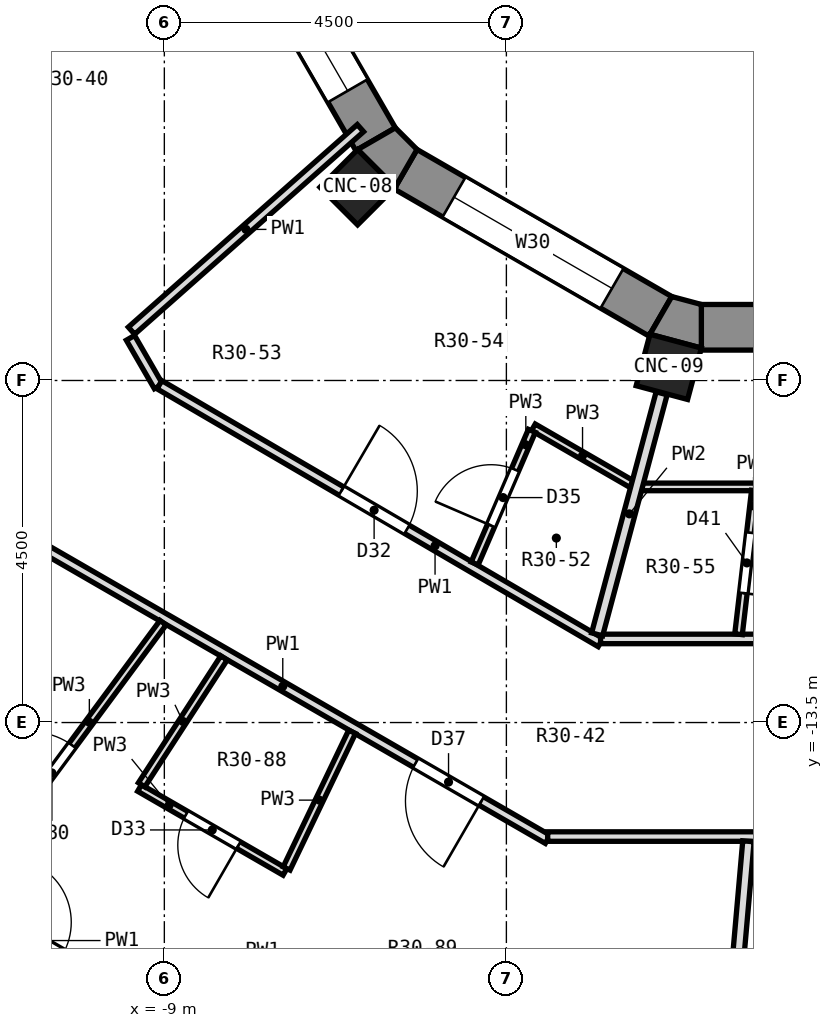
"""IFC4 building model, lengths in metres.
Left out: names, types, materials, properties, quantities, classifications, styles, units other than length and angle.
Written with IfcOpenShell. Run it as: python <this file> out.ifc"""

import sys

from ifc_helpers import new_model, si_unit, direction, frame, frame_2d, origin, origin_2d, place, context, subcontext, project, spatial, polyline, rectangle, outline, extrude, element, fill, save


model = new_model("IFC4")
c1 = context("Model", 3, precision=1e-05, world=origin(), true_north=direction((0.0, 1.0)))
c2 = subcontext(c1, "Body", "Model", "MODEL_VIEW")
j1 = project(units=[si_unit("LENGTHUNIT", "METRE"), si_unit("PLANEANGLEUNIT", "RADIAN")], contexts=[c1])
p1 = place(None, origin())
s1 = spatial("IfcSite", under=j1, at=p1, CompositionType="ELEMENT")
p2 = place(p1, origin())
s2 = spatial("IfcBuilding", under=s1, at=p2, CompositionType="ELEMENT")
p3 = place(p2, frame((0.0, 0.0, 210.3)))
s3 = spatial("IfcBuildingStorey", under=s2, at=p3, CompositionType="ELEMENT", Elevation=210.3)
for number, where, z_axis, x_axis in (
    (1, (-6.458, -6.458, 0.0), (0.0, 0.0, 1.0), (-0.707, -0.707, 0.0)),
    (2, (-2.364, -8.821, 0.0), (0.0, 0.0, 1.0), (-0.259, -0.966, 0.0)),
):
    element("IfcColumn", number, at=place(p3, frame(where, z_axis=z_axis, x_axis=x_axis)), inside=s3, PredefinedType="COLUMN", context=c2, shape_type="SweptSolid", body=[
        extrude(rectangle(XDim=0.7, YDim=0.7, at=origin_2d()), origin(), (0.0, 0.0, 1.0), 3.3),
    ])
p4 = place(p3, frame((-8.156, -2.474, 0.0), z_axis=(0.0, 0.0, 1.0), x_axis=(0.500033728941, -0.866005929495, 0.0)))
e3 = element("IfcWall", 3, at=p4, inside=s3, PredefinedType="SOLIDWALL", context=c2, shape_type="SweptSolid", body=[
    extrude(rectangle(XDim=3.87, YDim=0.6, at=frame_2d((1.935, 0.0))), origin(), (0.0, 0.0, 1.0), 2.85),
])
p5 = place(p4, frame((0.735, 0.0, 0.9)))
e4 = element("IfcOpeningElement", 4, at=p5, cuts=e3, PredefinedType="OPENING", context=c2, shape_type="SweptSolid", body=[
    extrude(rectangle(XDim=2.4, YDim=1.8, at=frame_2d((1.2, 0.9))), frame((0.0, 0.312, 0.0), z_axis=(0.0, -1.0, 0.0), x_axis=(1.0, 0.0, 0.0)), (0.0, 0.0, 1.0), 0.624),
])
p6 = place(p3, frame((-5.826, -6.22, 0.0), z_axis=(0.0, 0.0, 1.0), x_axis=(0.866005929495, -0.500033728941, 0.0)))
e5 = element("IfcWall", 5, at=p6, inside=s3, PredefinedType="SOLIDWALL", context=c2, shape_type="SweptSolid", body=[
    extrude(rectangle(XDim=3.87, YDim=0.6, at=frame_2d((1.935, 0.0))), origin(), (0.0, 0.0, 1.0), 2.85),
])
p7 = place(p6, frame((0.735, 0.0, 0.9)))
e6 = element("IfcOpeningElement", 6, at=p7, cuts=e5, PredefinedType="OPENING", context=c2, shape_type="SweptSolid", body=[
    extrude(rectangle(XDim=2.4, YDim=1.8, at=frame_2d((1.2, 0.9))), frame((0.0, 0.312, 0.0), z_axis=(0.0, -1.0, 0.0), x_axis=(1.0, 0.0, 0.0)), (0.0, 0.0, 1.0), 0.624),
])
p8 = place(p3, frame((-1.935, -8.3, 0.0), z_axis=(0.0, 0.0, 1.0), x_axis=(1.0, 0.0, 0.0)))
e7 = element("IfcWall", 7, at=p8, inside=s3, PredefinedType="SOLIDWALL", context=c2, shape_type="SweptSolid", body=[
    extrude(rectangle(XDim=3.87, YDim=0.6, at=frame_2d((1.935, 0.0))), origin(), (0.0, 0.0, 1.0), 2.85),
])
p9 = place(p8, frame((0.735, 0.0, 0.9)))
e8 = element("IfcOpeningElement", 8, at=p9, cuts=e7, PredefinedType="OPENING", context=c2, shape_type="SweptSolid", body=[
    extrude(rectangle(XDim=2.4, YDim=1.8, at=frame_2d((1.2, 0.9))), frame((0.0, 0.312, 0.0), z_axis=(0.0, -1.0, 0.0), x_axis=(1.0, 0.0, 0.0)), (0.0, 0.0, 1.0), 0.624),
])
p10 = place(p3, origin())
e9 = element("IfcWall", 9, at=p10, inside=s3, PredefinedType="SOLIDWALL", context=c2, shape_type="SweptSolid", body=[
    extrude(outline(polyline([(-6.458, -5.962), (-5.962, -6.458), (-5.676, -5.961), (-5.961, -5.676), (-6.458, -5.962)])), origin(), (0.0, 0.0, 1.0), 2.85),
])
p11 = place(p3, origin())
e10 = element("IfcWall", 10, at=p11, inside=s3, PredefinedType="SOLIDWALL", context=c2, shape_type="SweptSolid", body=[
    extrude(outline(polyline([(-1.935, -8.573), (-1.935, -8.0), (-2.324, -7.896), (-2.611, -8.392), (-1.935, -8.573)])), origin(), (0.0, 0.0, 1.0), 2.85),
])
p12 = place(p3, frame((-9.446, -8.439, 0.0), z_axis=(0.0, 0.0, 1.0), x_axis=(0.500735785949, -0.865600180609, 0.0)))
e11 = element("IfcWall", 11, at=p12, inside=s3, PredefinedType="PARTITIONING", context=c2, shape_type="SweptSolid", body=[
    extrude(rectangle(XDim=0.737, YDim=0.125, at=frame_2d((0.368, 0.0))), origin(), (0.0, 0.0, 1.0), 2.85),
])
p13 = place(p3, frame((-9.064, -9.056, 0.0), z_axis=(0.0, 0.0, 1.0), x_axis=(0.863361054342, -0.504586652464, 0.0)))
e12 = element("IfcWall", 12, at=p13, inside=s3, PredefinedType="PARTITIONING", context=c2, shape_type="SweptSolid", body=[
    extrude(rectangle(XDim=6.722, YDim=0.125, at=frame_2d((3.361, 0.0))), origin(), (0.0, 0.0, 1.0), 2.85),
])
p14 = place(p13, frame((2.771, 0.0, 0.0)))
e13 = element("IfcOpeningElement", 13, at=p14, cuts=e12, PredefinedType="OPENING", context=c2, shape_type="SweptSolid", body=[
    extrude(rectangle(XDim=1.0, YDim=2.1, at=frame_2d((0.5, 1.05))), frame((0.0, 0.074, 0.0), z_axis=(0.0, -1.0, 0.0), x_axis=(1.0, 0.0, 0.0)), (0.0, 0.0, 1.0), 0.149),
])
p15 = place(p3, frame((-11.186, -16.062, 0.0), z_axis=(0.0, 0.0, 1.0), x_axis=(0.865261949816, -0.501320015759, 0.0)))
e14 = element("IfcWall", 14, at=p15, inside=s3, PredefinedType="PARTITIONING", context=c2, shape_type="SweptSolid", body=[
    extrude(rectangle(XDim=1.221, YDim=0.125, at=frame_2d((0.61, 0.0))), origin(), (0.0, 0.0, 1.0), 2.85),
])
p16 = place(p15, frame((0.129, 0.0, 0.0)))
e15 = element("IfcOpeningElement", 15, at=p16, cuts=e14, PredefinedType="OPENING", context=c2, shape_type="SweptSolid", body=[
    extrude(rectangle(XDim=0.85, YDim=2.1, at=frame_2d((0.425, 1.05))), frame((0.0, 0.074, 0.0), z_axis=(0.0, -1.0, 0.0), x_axis=(1.0, 0.0, 0.0)), (0.0, 0.0, 1.0), 0.149),
])
p17 = place(p3, frame((-9.326, -14.361, 0.0), z_axis=(0.0, 0.0, 1.0), x_axis=(0.866099077695, -0.499872371326, 0.0)))
e16 = element("IfcWall", 16, at=p17, inside=s3, PredefinedType="PARTITIONING", context=c2, shape_type="SweptSolid", body=[
    extrude(rectangle(XDim=2.208, YDim=0.1, at=frame_2d((1.104, 0.0))), origin(), (0.0, 0.0, 1.0), 2.85),
])
p18 = place(p17, frame((0.704, 0.0, 0.0)))
e17 = element("IfcOpeningElement", 17, at=p18, cuts=e16, PredefinedType="OPENING", context=c2, shape_type="SweptSolid", body=[
    extrude(rectangle(XDim=0.8, YDim=2.1, at=frame_2d((0.4, 1.05))), frame((0.0, 0.062, 0.0), z_axis=(0.0, -1.0, 0.0), x_axis=(1.0, 0.0, 0.0)), (0.0, 0.0, 1.0), 0.124),
])
p19 = place(p3, frame((-10.927, -11.012, 0.0), z_axis=(0.0, 0.0, 1.0), x_axis=(0.866043138087, -0.49996928203, 0.0)))
e18 = element("IfcWall", 18, at=p19, inside=s3, PredefinedType="PARTITIONING", context=c2, shape_type="SweptSolid", body=[
    extrude(rectangle(XDim=8.048, YDim=0.125, at=frame_2d((4.024, 0.0))), origin(), (0.0, 0.0, 1.0), 2.85),
])
p20 = place(p19, frame((6.042, 0.0, 0.0)))
e19 = element("IfcOpeningElement", 19, at=p20, cuts=e18, PredefinedType="OPENING", context=c2, shape_type="SweptSolid", body=[
    extrude(rectangle(XDim=1.0, YDim=2.1, at=frame_2d((0.5, 1.05))), frame((0.0, 0.074, 0.0), z_axis=(0.0, -1.0, 0.0), x_axis=(1.0, 0.0, 0.0)), (0.0, 0.0, 1.0), 0.149),
])
p21 = place(p3, frame((-4.145, -9.616, 0.0), z_axis=(0.0, 0.0, 1.0), x_axis=(0.866000409959, -0.500043288077, 0.0)))
e20 = element("IfcWall", 20, at=p21, inside=s3, PredefinedType="PARTITIONING", context=c2, shape_type="SweptSolid", body=[
    extrude(rectangle(XDim=1.493, YDim=0.1, at=frame_2d((0.747, 0.0))), origin(), (0.0, 0.0, 1.0), 2.85),
])
p22 = place(p3, frame((-3.957, -15.0, 0.0), z_axis=(0.0, 0.0, 1.0), x_axis=(1.0, 0.0, 0.0)))
e21 = element("IfcWall", 21, at=p22, inside=s3, PredefinedType="PARTITIONING", context=c2, shape_type="SweptSolid", body=[
    extrude(rectangle(XDim=8.048, YDim=0.125, at=frame_2d((4.024, 0.0))), origin(), (0.0, 0.0, 1.0), 2.85),
])
p23 = place(p22, frame((4.463, 0.0, 0.0)))
e22 = element("IfcOpeningElement", 22, at=p23, cuts=e21, PredefinedType="OPENING", context=c2, shape_type="SweptSolid", body=[
    extrude(rectangle(XDim=1.0, YDim=2.1, at=frame_2d((0.5, 1.05))), frame((0.0, 0.074, 0.0), z_axis=(0.0, -1.0, 0.0), x_axis=(1.0, 0.0, 0.0)), (0.0, 0.0, 1.0), 0.149),
])
p24 = place(p3, frame((-3.26, -12.4, 0.0), z_axis=(0.0, 0.0, 1.0), x_axis=(1.0, 0.0, 0.0)))
e23 = element("IfcWall", 23, at=p24, inside=s3, PredefinedType="PARTITIONING", context=c2, shape_type="SweptSolid", body=[
    extrude(rectangle(XDim=6.509, YDim=0.125, at=frame_2d((3.254, 0.0))), origin(), (0.0, 0.0, 1.0), 2.85),
])
p25 = place(p24, frame((2.811, 0.0, 0.0)))
e24 = element("IfcOpeningElement", 24, at=p25, cuts=e23, PredefinedType="OPENING", context=c2, shape_type="SweptSolid", body=[
    extrude(rectangle(XDim=1.0, YDim=2.1, at=frame_2d((0.5, 1.05))), frame((0.0, 0.074, 0.0), z_axis=(0.0, -1.0, 0.0), x_axis=(1.0, 0.0, 0.0)), (0.0, 0.0, 1.0), 0.149),
])
p26 = place(p3, frame((-2.712, -10.4, 0.0), z_axis=(0.0, 0.0, 1.0), x_axis=(1.0, 0.0, 0.0)))
e25 = element("IfcWall", 25, at=p26, inside=s3, PredefinedType="PARTITIONING", context=c2, shape_type="SweptSolid", body=[
    extrude(rectangle(XDim=1.493, YDim=0.1, at=frame_2d((0.747, 0.0))), origin(), (0.0, 0.0, 1.0), 2.85),
])
p27 = place(p3, frame((-9.432, -8.345, 0.0), z_axis=(0.0, 0.0, 1.0), x_axis=(0.748978023249, 0.662594839015, 0.0)))
e26 = element("IfcWall", 26, at=p27, inside=s3, PredefinedType="PARTITIONING", context=c2, shape_type="SweptSolid", body=[
    extrude(rectangle(XDim=4.022, YDim=0.125, at=frame_2d((2.011, 0.0))), origin(), (0.0, 0.0, 1.0), 2.85),
])
p28 = place(p3, frame((-11.593, -15.667, 0.0), z_axis=(0.0, 0.0, 1.0), x_axis=(0.594790535758, 0.803880724096, 0.0)))
e27 = element("IfcWall", 27, at=p28, inside=s3, PredefinedType="PARTITIONING", context=c2, shape_type="SweptSolid", body=[
    extrude(rectangle(XDim=4.33, YDim=0.1, at=frame_2d((2.165, 0.0))), origin(), (0.0, 0.0, 1.0), 2.85),
])
p29 = place(p28, frame((1.421, 0.0, 0.0)))
e28 = element("IfcOpeningElement", 28, at=p29, cuts=e27, PredefinedType="OPENING", context=c2, shape_type="SweptSolid", body=[
    extrude(rectangle(XDim=0.9, YDim=2.1, at=frame_2d((0.45, 1.05))), frame((0.0, 0.062, 0.0), z_axis=(0.0, -1.0, 0.0), x_axis=(1.0, 0.0, 0.0)), (0.0, 0.0, 1.0), 0.124),
])
p30 = place(p3, frame((-9.299, -14.319, 0.0), z_axis=(0.0, 0.0, 1.0), x_axis=(0.544496746538, 0.838762954004, 0.0)))
e29 = element("IfcWall", 29, at=p30, inside=s3, PredefinedType="PARTITIONING", context=c2, shape_type="SweptSolid", body=[
    extrude(rectangle(XDim=1.99, YDim=0.1, at=frame_2d((0.995, 0.0))), origin(), (0.0, 0.0, 1.0), 2.85),
])
p31 = place(p3, frame((-7.391, -15.42, 0.0), z_axis=(0.0, 0.0, 1.0), x_axis=(0.432109804396, 0.901821000501, 0.0)))
e30 = element("IfcWall", 30, at=p31, inside=s3, PredefinedType="PARTITIONING", context=c2, shape_type="SweptSolid", body=[
    extrude(rectangle(XDim=1.993, YDim=0.1, at=frame_2d((0.997, 0.0))), origin(), (0.0, 0.0, 1.0), 2.85),
])
p32 = place(p3, frame((-4.917, -11.408, 0.0), z_axis=(0.0, 0.0, 1.0), x_axis=(0.395793869696, 0.918339377742, 0.0)))
e31 = element("IfcWall", 31, at=p32, inside=s3, PredefinedType="PARTITIONING", context=c2, shape_type="SweptSolid", body=[
    extrude(rectangle(XDim=1.901, YDim=0.1, at=frame_2d((0.951, 0.0))), origin(), (0.0, 0.0, 1.0), 2.85),
])
p33 = place(p32, frame((0.544, 0.0, 0.0)))
e32 = element("IfcOpeningElement", 32, at=p33, cuts=e31, PredefinedType="OPENING", context=c2, shape_type="SweptSolid", body=[
    extrude(rectangle(XDim=0.8, YDim=2.1, at=frame_2d((0.4, 1.05))), frame((0.0, 0.062, 0.0), z_axis=(0.0, -1.0, 0.0), x_axis=(1.0, 0.0, 0.0)), (0.0, 0.0, 1.0), 0.124),
])
p34 = place(p3, frame((-3.306, -12.34, 0.0), z_axis=(0.0, 0.0, 1.0), x_axis=(0.258514270355, 0.966007438907, 0.0)))
e33 = element("IfcWall", 33, at=p34, inside=s3, PredefinedType="PARTITIONING", context=c2, shape_type="SweptSolid", body=[
    extrude(rectangle(XDim=3.283, YDim=0.15, at=frame_2d((1.641, 0.0))), origin(), (0.0, 0.0, 1.0), 2.85),
])
p35 = place(p3, frame((-1.446, -12.338, 0.0), z_axis=(0.0, 0.0, 1.0), x_axis=(0.116222778511, 0.993223170166, 0.0)))
e34 = element("IfcWall", 34, at=p35, inside=s3, PredefinedType="PARTITIONING", context=c2, shape_type="SweptSolid", body=[
    extrude(rectangle(XDim=1.901, YDim=0.1, at=frame_2d((0.951, 0.0))), origin(), (0.0, 0.0, 1.0), 2.85),
])
p36 = place(p35, frame((0.544, 0.0, 0.0)))
e35 = element("IfcOpeningElement", 35, at=p36, cuts=e34, PredefinedType="OPENING", context=c2, shape_type="SweptSolid", body=[
    extrude(rectangle(XDim=0.8, YDim=2.1, at=frame_2d((0.4, 1.05))), frame((0.0, 0.062, 0.0), z_axis=(0.0, -1.0, 0.0), x_axis=(1.0, 0.0, 0.0)), (0.0, 0.0, 1.0), 0.124),
])
p37 = place(p3, frame((-2.07, -23.65, 0.0), z_axis=(0.0, 0.0, 1.0), x_axis=(0.087486308122, 0.996165722102, 0.0)))
e36 = element("IfcWall", 36, at=p37, inside=s3, PredefinedType="PARTITIONING", context=c2, shape_type="SweptSolid", body=[
    extrude(rectangle(XDim=8.62, YDim=0.15, at=frame_2d((4.31, 0.0))), origin(), (0.0, 0.0, 1.0), 2.85),
])
p38 = place(p5, origin())
e37 = element("IfcWindow", 37, at=p38, inside=s3, PartitioningType="SINGLE_PANEL", PredefinedType="WINDOW", context=c2, shape_type="SweptSolid", body=[
    extrude(rectangle(XDim=2.4, YDim=1.8, at=frame_2d((1.2, 0.9))), frame((0.0, -0.12, 0.0), z_axis=(0.0, -1.0, 0.0), x_axis=(1.0, 0.0, 0.0)), (0.0, 0.0, 1.0), 0.06),
])
fill(e4, e37)
p39 = place(p7, origin())
e38 = element("IfcWindow", 38, at=p39, inside=s3, PartitioningType="SINGLE_PANEL", PredefinedType="WINDOW", context=c2, shape_type="SweptSolid", body=[
    extrude(rectangle(XDim=2.4, YDim=1.8, at=frame_2d((1.2, 0.9))), frame((0.0, -0.12, 0.0), z_axis=(0.0, -1.0, 0.0), x_axis=(1.0, 0.0, 0.0)), (0.0, 0.0, 1.0), 0.06),
])
fill(e6, e38)
p40 = place(p29, origin())
e39 = element("IfcDoor", 39, at=p40, inside=s3, OperationType="SINGLE_SWING_LEFT", PredefinedType="DOOR", context=c2, shape_type="SweptSolid", body=[
    extrude(rectangle(XDim=0.9, YDim=2.1, at=frame_2d((0.45, 1.05))), frame((0.0, 0.025, 0.0), z_axis=(0.0, -1.0, 0.0), x_axis=(1.0, 0.0, 0.0)), (0.0, 0.0, 1.0), 0.05),
])
fill(e28, e39)
p41 = place(p16, origin())
e40 = element("IfcDoor", 40, at=p41, inside=s3, OperationType="SINGLE_SWING_LEFT", PredefinedType="DOOR", context=c2, shape_type="SweptSolid", body=[
    extrude(rectangle(XDim=0.85, YDim=2.1, at=frame_2d((0.425, 1.05))), frame((0.0, 0.025, 0.0), z_axis=(0.0, -1.0, 0.0), x_axis=(1.0, 0.0, 0.0)), (0.0, 0.0, 1.0), 0.05),
])
fill(e15, e40)
p42 = place(p14, origin())
e41 = element("IfcDoor", 41, at=p42, inside=s3, OperationType="SINGLE_SWING_LEFT", PredefinedType="DOOR", context=c2, shape_type="SweptSolid", body=[
    extrude(rectangle(XDim=1.0, YDim=2.1, at=frame_2d((0.5, 1.05))), frame((0.0, 0.025, 0.0), z_axis=(0.0, -1.0, 0.0), x_axis=(1.0, 0.0, 0.0)), (0.0, 0.0, 1.0), 0.05),
])
fill(e13, e41)
p43 = place(p18, frame((0.8, 0.0, 0.0), z_axis=(0.0, 0.0, 1.0), x_axis=(-1.0, 0.0, 0.0)))
e42 = element("IfcDoor", 42, at=p43, inside=s3, OperationType="SINGLE_SWING_LEFT", PredefinedType="DOOR", context=c2, shape_type="SweptSolid", body=[
    extrude(rectangle(XDim=0.8, YDim=2.1, at=frame_2d((0.4, 1.05))), frame((0.0, 0.025, 0.0), z_axis=(0.0, -1.0, 0.0), x_axis=(1.0, 0.0, 0.0)), (0.0, 0.0, 1.0), 0.05),
])
fill(e17, e42)
p44 = place(p33, origin())
e43 = element("IfcDoor", 43, at=p44, inside=s3, OperationType="SINGLE_SWING_LEFT", PredefinedType="DOOR", context=c2, shape_type="SweptSolid", body=[
    extrude(rectangle(XDim=0.8, YDim=2.1, at=frame_2d((0.4, 1.05))), frame((0.0, 0.025, 0.0), z_axis=(0.0, -1.0, 0.0), x_axis=(1.0, 0.0, 0.0)), (0.0, 0.0, 1.0), 0.05),
])
fill(e32, e43)
p45 = place(p20, frame((1.0, 0.0, 0.0), z_axis=(0.0, 0.0, 1.0), x_axis=(-1.0, 0.0, 0.0)))
e44 = element("IfcDoor", 44, at=p45, inside=s3, OperationType="SINGLE_SWING_LEFT", PredefinedType="DOOR", context=c2, shape_type="SweptSolid", body=[
    extrude(rectangle(XDim=1.0, YDim=2.1, at=frame_2d((0.5, 1.05))), frame((0.0, 0.025, 0.0), z_axis=(0.0, -1.0, 0.0), x_axis=(1.0, 0.0, 0.0)), (0.0, 0.0, 1.0), 0.05),
])
fill(e19, e44)
p46 = place(p36, frame((0.8, 0.0, 0.0), z_axis=(0.0, 0.0, 1.0), x_axis=(-1.0, 0.0, 0.0)))
e45 = element("IfcDoor", 45, at=p46, inside=s3, OperationType="SINGLE_SWING_RIGHT", PredefinedType="DOOR", context=c2, shape_type="SweptSolid", body=[
    extrude(rectangle(XDim=0.8, YDim=2.1, at=frame_2d((0.4, 1.05))), frame((0.0, 0.025, 0.0), z_axis=(0.0, -1.0, 0.0), x_axis=(1.0, 0.0, 0.0)), (0.0, 0.0, 1.0), 0.05),
])
fill(e35, e45)
save(model, sys.argv[1])
